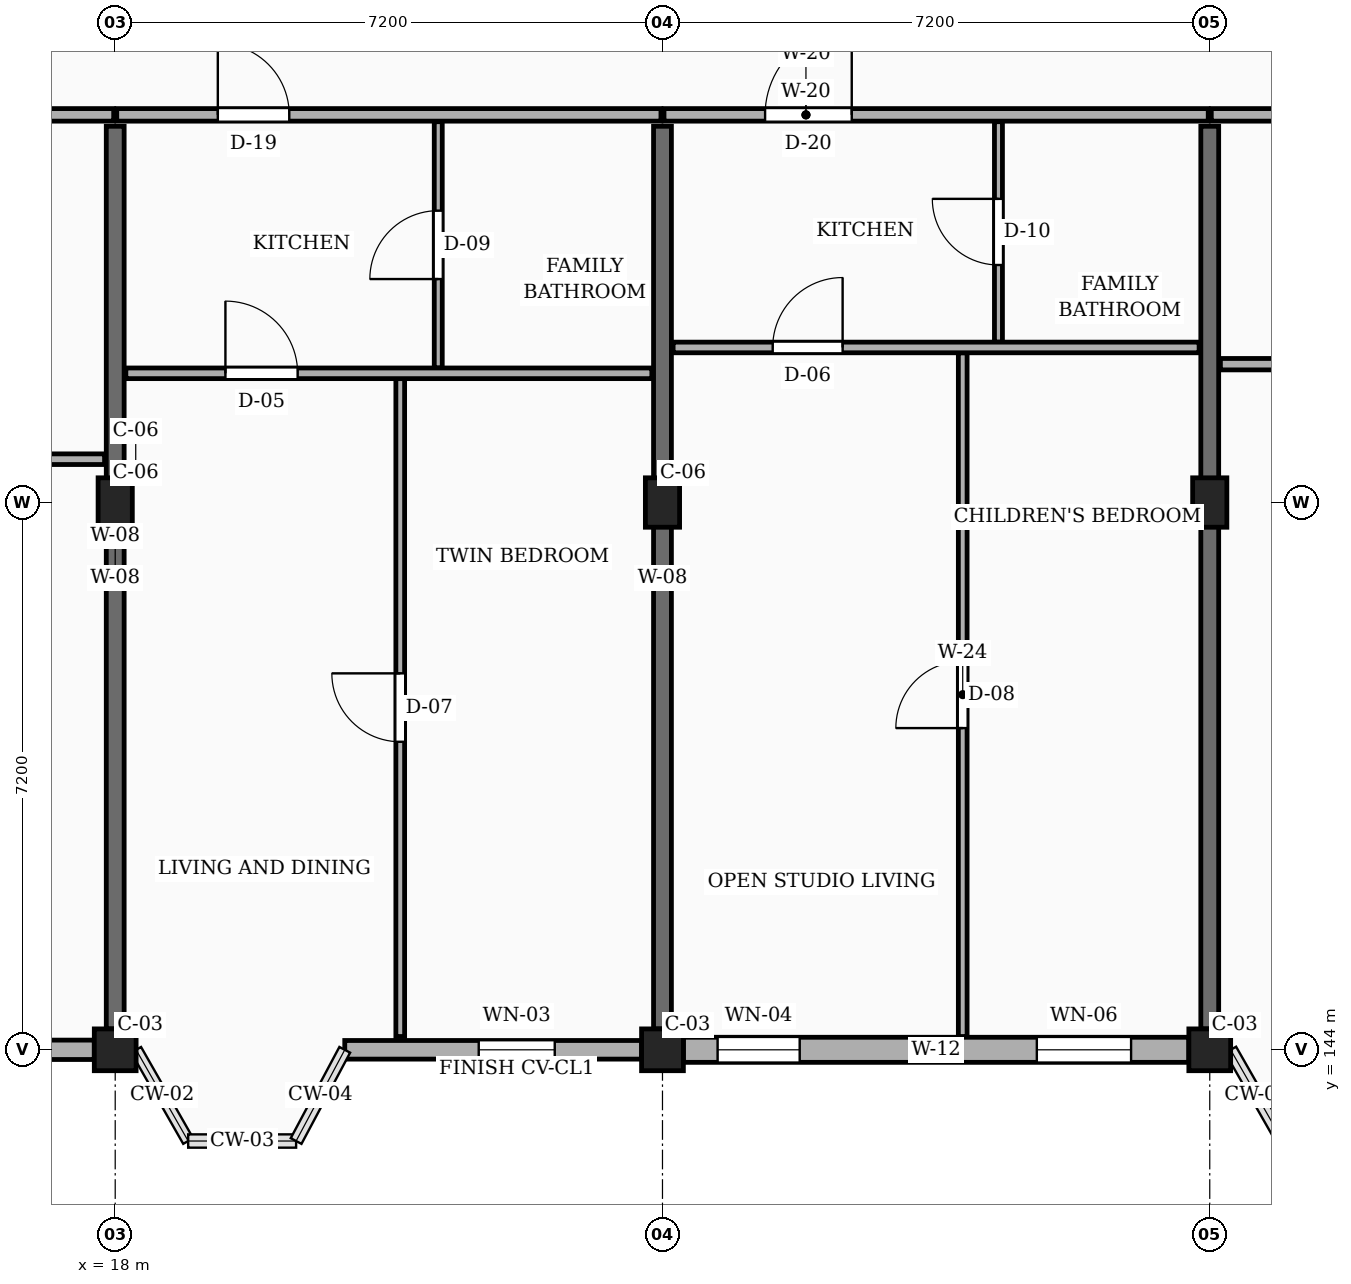
"""IFC4 building model, lengths in metres.
Left out: names, types, materials, properties, quantities, classifications, styles, units other than length and angle.
Written with IfcOpenShell. Run it as: python <this file> out.ifc"""

import sys

from ifc_helpers import new_model, si_unit, direction, frame, frame_2d, origin, origin_2d, place, context, subcontext, project, spatial, rectangle, extrude, element, fill, save


model = new_model("IFC4")
c1 = context("Model", 3, precision=1e-05, world=origin(), true_north=direction((0.0, 1.0)))
c2 = subcontext(c1, "Body", "Model", "MODEL_VIEW")
j1 = project(units=[si_unit("LENGTHUNIT", "METRE"), si_unit("PLANEANGLEUNIT", "RADIAN")], contexts=[c1])
p1 = place(None, origin())
s1 = spatial("IfcSite", under=j1, at=p1, CompositionType="ELEMENT")
p2 = place(p1, origin())
s2 = spatial("IfcBuilding", under=s1, at=p2, CompositionType="ELEMENT")
p3 = place(p2, frame((0.0, 0.0, 17.1)))
s3 = spatial("IfcBuildingStorey", under=s2, at=p3, CompositionType="ELEMENT", Elevation=17.1)
p4 = place(p3, frame((18.0, 144.0, 0.0), z_axis=(0.0, 0.0, 1.0), x_axis=(1.0, 0.0, 0.0)))
e1 = element("IfcColumn", 1, at=p4, inside=s3, PredefinedType="COLUMN", context=c2, shape_type="SweptSolid", body=[
    extrude(rectangle(XDim=0.55, YDim=0.55, at=origin_2d()), origin(), (0.0, 0.0, 1.0), 3.15),
])
p5 = place(p3, frame((18.0, 151.2, 0.0), z_axis=(0.0, 0.0, 1.0), x_axis=(1.0, 0.0, 0.0)))
e2 = element("IfcColumn", 2, at=p5, inside=s3, PredefinedType="COLUMN", context=c2, shape_type="SweptSolid", body=[
    extrude(rectangle(XDim=0.45, YDim=0.65, at=origin_2d()), origin(), (0.0, 0.0, 1.0), 3.15),
])
p6 = place(p3, frame((25.2, 144.0, 0.0), z_axis=(0.0, 0.0, 1.0), x_axis=(1.0, 0.0, 0.0)))
e3 = element("IfcColumn", 3, at=p6, inside=s3, PredefinedType="COLUMN", context=c2, shape_type="SweptSolid", body=[
    extrude(rectangle(XDim=0.55, YDim=0.55, at=origin_2d()), origin(), (0.0, 0.0, 1.0), 3.15),
])
p7 = place(p3, frame((25.2, 151.2, 0.0), z_axis=(0.0, 0.0, 1.0), x_axis=(1.0, 0.0, 0.0)))
e4 = element("IfcColumn", 4, at=p7, inside=s3, PredefinedType="COLUMN", context=c2, shape_type="SweptSolid", body=[
    extrude(rectangle(XDim=0.45, YDim=0.65, at=origin_2d()), origin(), (0.0, 0.0, 1.0), 3.15),
])
p8 = place(p3, frame((32.4, 144.0, 0.0), z_axis=(0.0, 0.0, 1.0), x_axis=(1.0, 0.0, 0.0)))
e5 = element("IfcColumn", 5, at=p8, inside=s3, PredefinedType="COLUMN", context=c2, shape_type="SweptSolid", body=[
    extrude(rectangle(XDim=0.55, YDim=0.55, at=origin_2d()), origin(), (0.0, 0.0, 1.0), 3.15),
])
p9 = place(p3, frame((32.4, 151.2, 0.0), z_axis=(0.0, 0.0, 1.0), x_axis=(1.0, 0.0, 0.0)))
e6 = element("IfcColumn", 6, at=p9, inside=s3, PredefinedType="COLUMN", context=c2, shape_type="SweptSolid", body=[
    extrude(rectangle(XDim=0.45, YDim=0.65, at=origin_2d()), origin(), (0.0, 0.0, 1.0), 3.15),
])
for number, where, z_axis, x_axis in (
    (7, (18.0, 144.275, 0.0), (0.0, 0.0, 1.0), (0.0, 1.0, 0.0)),
    (8, (25.2, 144.275, 0.0), (0.0, 0.0, 1.0), (0.0, 1.0, 0.0)),
    (9, (32.4, 144.275, 0.0), (0.0, 0.0, 1.0), (0.0, 1.0, 0.0)),
):
    element("IfcWall", number, at=place(p3, frame(where, z_axis=z_axis, x_axis=x_axis)), inside=s3, PredefinedType="SOLIDWALL", context=c2, shape_type="SweptSolid", body=[
        extrude(rectangle(XDim=11.875, YDim=0.235, at=frame_2d((5.938, 0.0))), origin(), (0.0, 0.0, 1.0), 2.185),
    ])
p10 = place(p3, frame((11.075, 144.0, 0.0), z_axis=(0.0, 0.0, 1.0), x_axis=(1.0, 0.0, 0.0)))
e10 = element("IfcWall", 10, at=p10, inside=s3, PredefinedType="SOLIDWALL", context=c2, shape_type="SweptSolid", body=[
    extrude(rectangle(XDim=6.65, YDim=0.255, at=frame_2d((3.325, 0.0))), origin(), (0.0, 0.0, 1.0), 2.455),
])
p11 = place(p10, frame((0.45, 0.0, 0.78)))
e11 = element("IfcOpeningElement", 11, at=p11, cuts=e10, PredefinedType="OPENING", context=c2, shape_type="SweptSolid", body=[
    extrude(rectangle(XDim=0.85, YDim=1.15, at=frame_2d((0.425, 0.575))), frame((0.0, 0.137, 0.0), z_axis=(0.0, -1.0, 0.0), x_axis=(1.0, 0.0, 0.0)), (0.0, 0.0, 1.0), 0.275),
])
p12 = place(p10, frame((4.65, 0.0, 0.78)))
e12 = element("IfcOpeningElement", 12, at=p12, cuts=e10, PredefinedType="OPENING", context=c2, shape_type="SweptSolid", body=[
    extrude(rectangle(XDim=1.0, YDim=1.15, at=frame_2d((0.5, 0.575))), frame((0.0, 0.137, 0.0), z_axis=(0.0, -1.0, 0.0), x_axis=(1.0, 0.0, 0.0)), (0.0, 0.0, 1.0), 0.275),
])
p13 = place(p3, frame((21.02, 144.0, 0.0), z_axis=(0.0, 0.0, 1.0), x_axis=(1.0, 0.0, 0.0)))
e13 = element("IfcWall", 13, at=p13, inside=s3, PredefinedType="SOLIDWALL", context=c2, shape_type="SweptSolid", body=[
    extrude(rectangle(XDim=3.905, YDim=0.245, at=frame_2d((1.953, 0.0))), origin(), (0.0, 0.0, 1.0), 2.455),
])
p14 = place(p13, frame((1.762, 0.0, 0.78)))
e14 = element("IfcOpeningElement", 14, at=p14, cuts=e13, PredefinedType="OPENING", context=c2, shape_type="SweptSolid", body=[
    extrude(rectangle(XDim=1.0, YDim=1.15, at=frame_2d((0.5, 0.575))), frame((0.0, 0.133, 0.0), z_axis=(0.0, -1.0, 0.0), x_axis=(1.0, 0.0, 0.0)), (0.0, 0.0, 1.0), 0.265),
])
p15 = place(p3, frame((25.475, 144.0, 0.0), z_axis=(0.0, 0.0, 1.0), x_axis=(1.0, 0.0, 0.0)))
e15 = element("IfcWall", 15, at=p15, inside=s3, PredefinedType="SOLIDWALL", context=c2, shape_type="SweptSolid", body=[
    extrude(rectangle(XDim=6.65, YDim=0.33, at=frame_2d((3.325, 0.0))), origin(), (0.0, 0.0, 1.0), 2.455),
])
p16 = place(p15, frame((0.45, 0.0, 0.78)))
e16 = element("IfcOpeningElement", 16, at=p16, cuts=e15, PredefinedType="OPENING", context=c2, shape_type="SweptSolid", body=[
    extrude(rectangle(XDim=1.08, YDim=1.15, at=frame_2d((0.54, 0.575))), frame((0.0, 0.175, 0.0), z_axis=(0.0, -1.0, 0.0), x_axis=(1.0, 0.0, 0.0)), (0.0, 0.0, 1.0), 0.35),
])
p17 = place(p15, frame((4.65, 0.0, 0.78)))
e17 = element("IfcOpeningElement", 17, at=p17, cuts=e15, PredefinedType="OPENING", context=c2, shape_type="SweptSolid", body=[
    extrude(rectangle(XDim=1.24, YDim=1.15, at=frame_2d((0.62, 0.575))), frame((0.0, 0.175, 0.0), z_axis=(0.0, -1.0, 0.0), x_axis=(1.0, 0.0, 0.0)), (0.0, 0.0, 1.0), 0.35),
])
p18 = place(p3, frame((10.975, 156.3, 0.0), z_axis=(0.0, 0.0, 1.0), x_axis=(1.0, 0.0, 0.0)))
e18 = element("IfcWall", 18, at=p18, inside=s3, PredefinedType="PARTITIONING", context=c2, shape_type="SweptSolid", body=[
    extrude(rectangle(XDim=7.005, YDim=0.165, at=frame_2d((3.502, 0.0))), origin(), (0.0, 0.0, 1.0), 2.32),
])
p19 = place(p18, frame((4.625, 0.0, 0.0)))
e19 = element("IfcOpeningElement", 19, at=p19, cuts=e18, PredefinedType="OPENING", context=c2, shape_type="SweptSolid", body=[
    extrude(rectangle(XDim=1.0, YDim=2.15, at=frame_2d((0.5, 1.075))), frame((0.0, 0.093, 0.0), z_axis=(0.0, -1.0, 0.0), x_axis=(1.0, 0.0, 0.0)), (0.0, 0.0, 1.0), 0.185),
])
p20 = place(p3, frame((18.02, 156.3, 0.0), z_axis=(0.0, 0.0, 1.0), x_axis=(1.0, 0.0, 0.0)))
e20 = element("IfcWall", 20, at=p20, inside=s3, PredefinedType="PARTITIONING", context=c2, shape_type="SweptSolid", body=[
    extrude(rectangle(XDim=7.16, YDim=0.165, at=frame_2d((3.58, 0.0))), origin(), (0.0, 0.0, 1.0), 2.32),
])
p21 = place(p20, frame((1.33, 0.0, 0.0)))
e21 = element("IfcOpeningElement", 21, at=p21, cuts=e20, PredefinedType="OPENING", context=c2, shape_type="SweptSolid", body=[
    extrude(rectangle(XDim=0.94, YDim=2.12, at=frame_2d((0.47, 1.06))), frame((0.0, 0.093, 0.0), z_axis=(0.0, -1.0, 0.0), x_axis=(1.0, 0.0, 0.0)), (0.0, 0.0, 1.0), 0.185),
])
p22 = place(p3, frame((25.22, 156.3, 0.0), z_axis=(0.0, 0.0, 1.0), x_axis=(1.0, 0.0, 0.0)))
e22 = element("IfcWall", 22, at=p22, inside=s3, PredefinedType="PARTITIONING", context=c2, shape_type="SweptSolid", body=[
    extrude(rectangle(XDim=7.16, YDim=0.165, at=frame_2d((3.58, 0.0))), origin(), (0.0, 0.0, 1.0), 2.32),
])
p23 = place(p22, frame((1.33, 0.0, 0.0)))
e23 = element("IfcOpeningElement", 23, at=p23, cuts=e22, PredefinedType="OPENING", context=c2, shape_type="SweptSolid", body=[
    extrude(rectangle(XDim=1.14, YDim=2.18, at=frame_2d((0.57, 1.09))), frame((0.0, 0.093, 0.0), z_axis=(0.0, -1.0, 0.0), x_axis=(1.0, 0.0, 0.0)), (0.0, 0.0, 1.0), 0.185),
])
p24 = place(p3, frame((32.42, 156.3, 0.0), z_axis=(0.0, 0.0, 1.0), x_axis=(1.0, 0.0, 0.0)))
e24 = element("IfcWall", 24, at=p24, inside=s3, PredefinedType="PARTITIONING", context=c2, shape_type="SweptSolid", body=[
    extrude(rectangle(XDim=7.16, YDim=0.165, at=frame_2d((3.58, 0.0))), origin(), (0.0, 0.0, 1.0), 2.32),
])
p25 = place(p24, frame((1.33, 0.0, 0.0)))
e25 = element("IfcOpeningElement", 25, at=p25, cuts=e24, PredefinedType="OPENING", context=c2, shape_type="SweptSolid", body=[
    extrude(rectangle(XDim=1.0, YDim=2.15, at=frame_2d((0.5, 1.075))), frame((0.0, 0.093, 0.0), z_axis=(0.0, -1.0, 0.0), x_axis=(1.0, 0.0, 0.0)), (0.0, 0.0, 1.0), 0.185),
])
p26 = place(p3, frame((10.975, 151.77, 0.0), z_axis=(0.0, 0.0, 1.0), x_axis=(1.0, 0.0, 0.0)))
e26 = element("IfcWall", 26, at=p26, inside=s3, PredefinedType="PARTITIONING", context=c2, shape_type="SweptSolid", body=[
    extrude(rectangle(XDim=6.885, YDim=0.14, at=frame_2d((3.442, 0.0))), origin(), (0.0, 0.0, 1.0), 2.32),
])
p27 = place(p26, frame((4.625, 0.0, 0.0)))
e27 = element("IfcOpeningElement", 27, at=p27, cuts=e26, PredefinedType="OPENING", context=c2, shape_type="SweptSolid", body=[
    extrude(rectangle(XDim=0.92, YDim=2.1, at=frame_2d((0.46, 1.05))), frame((0.0, 0.08, 0.0), z_axis=(0.0, -1.0, 0.0), x_axis=(1.0, 0.0, 0.0)), (0.0, 0.0, 1.0), 0.16),
])
p28 = place(p3, frame((21.75, 144.175, 0.0), z_axis=(0.0, 0.0, 1.0), x_axis=(0.0, 1.0, 0.0)))
e28 = element("IfcWall", 28, at=p28, inside=s3, PredefinedType="PARTITIONING", context=c2, shape_type="SweptSolid", body=[
    extrude(rectangle(XDim=8.655, YDim=0.115, at=frame_2d((4.328, 0.0))), origin(), (0.0, 0.0, 1.0), 2.32),
])
p29 = place(p28, frame((3.877, 0.0, 0.0)))
e29 = element("IfcOpeningElement", 29, at=p29, cuts=e28, PredefinedType="OPENING", context=c2, shape_type="SweptSolid", body=[
    extrude(rectangle(XDim=0.9, YDim=2.1, at=frame_2d((0.45, 1.05))), frame((0.0, 0.067, 0.0), z_axis=(0.0, -1.0, 0.0), x_axis=(1.0, 0.0, 0.0)), (0.0, 0.0, 1.0), 0.135),
])
p30 = place(p3, frame((22.25, 152.97, 0.0), z_axis=(0.0, 0.0, 1.0), x_axis=(0.0, 1.0, 0.0)))
e30 = element("IfcWall", 30, at=p30, inside=s3, PredefinedType="PARTITIONING", context=c2, shape_type="SweptSolid", body=[
    extrude(rectangle(XDim=3.24, YDim=0.105, at=frame_2d((1.62, 0.0))), origin(), (0.0, 0.0, 1.0), 2.32),
])
p31 = place(p30, frame((1.17, 0.0, 0.0)))
e31 = element("IfcOpeningElement", 31, at=p31, cuts=e30, PredefinedType="OPENING", context=c2, shape_type="SweptSolid", body=[
    extrude(rectangle(XDim=0.9, YDim=2.05, at=frame_2d((0.45, 1.025))), frame((0.0, 0.062, 0.0), z_axis=(0.0, -1.0, 0.0), x_axis=(1.0, 0.0, 0.0)), (0.0, 0.0, 1.0), 0.125),
])
p32 = place(p3, frame((18.14, 152.9, 0.0), z_axis=(0.0, 0.0, 1.0), x_axis=(1.0, 0.0, 0.0)))
e32 = element("IfcWall", 32, at=p32, inside=s3, PredefinedType="PARTITIONING", context=c2, shape_type="SweptSolid", body=[
    extrude(rectangle(XDim=6.92, YDim=0.14, at=frame_2d((3.46, 0.0))), origin(), (0.0, 0.0, 1.0), 2.32),
])
p33 = place(p32, frame((1.31, 0.0, 0.0)))
e33 = element("IfcOpeningElement", 33, at=p33, cuts=e32, PredefinedType="OPENING", context=c2, shape_type="SweptSolid", body=[
    extrude(rectangle(XDim=0.95, YDim=2.1, at=frame_2d((0.475, 1.05))), frame((0.0, 0.08, 0.0), z_axis=(0.0, -1.0, 0.0), x_axis=(1.0, 0.0, 0.0)), (0.0, 0.0, 1.0), 0.16),
])
p34 = place(p3, frame((29.15, 144.175, 0.0), z_axis=(0.0, 0.0, 1.0), x_axis=(0.0, 1.0, 0.0)))
e34 = element("IfcWall", 34, at=p34, inside=s3, PredefinedType="PARTITIONING", context=c2, shape_type="SweptSolid", body=[
    extrude(rectangle(XDim=8.995, YDim=0.115, at=frame_2d((4.498, 0.0))), origin(), (0.0, 0.0, 1.0), 2.32),
])
p35 = place(p34, frame((4.058, 0.0, 0.0)))
e35 = element("IfcOpeningElement", 35, at=p35, cuts=e34, PredefinedType="OPENING", context=c2, shape_type="SweptSolid", body=[
    extrude(rectangle(XDim=0.88, YDim=2.08, at=frame_2d((0.44, 1.04))), frame((0.0, 0.067, 0.0), z_axis=(0.0, -1.0, 0.0), x_axis=(1.0, 0.0, 0.0)), (0.0, 0.0, 1.0), 0.135),
])
p36 = place(p3, frame((29.62, 153.31, 0.0), z_axis=(0.0, 0.0, 1.0), x_axis=(0.0, 1.0, 0.0)))
e36 = element("IfcWall", 36, at=p36, inside=s3, PredefinedType="PARTITIONING", context=c2, shape_type="SweptSolid", body=[
    extrude(rectangle(XDim=2.9, YDim=0.105, at=frame_2d((1.45, 0.0))), origin(), (0.0, 0.0, 1.0), 2.32),
])
p37 = place(p36, frame((1.015, 0.0, 0.0)))
e37 = element("IfcOpeningElement", 37, at=p37, cuts=e36, PredefinedType="OPENING", context=c2, shape_type="SweptSolid", body=[
    extrude(rectangle(XDim=0.87, YDim=2.05, at=frame_2d((0.435, 1.025))), frame((0.0, 0.062, 0.0), z_axis=(0.0, -1.0, 0.0), x_axis=(1.0, 0.0, 0.0)), (0.0, 0.0, 1.0), 0.125),
])
p38 = place(p3, frame((25.34, 153.24, 0.0), z_axis=(0.0, 0.0, 1.0), x_axis=(1.0, 0.0, 0.0)))
e38 = element("IfcWall", 38, at=p38, inside=s3, PredefinedType="PARTITIONING", context=c2, shape_type="SweptSolid", body=[
    extrude(rectangle(XDim=6.92, YDim=0.14, at=frame_2d((3.46, 0.0))), origin(), (0.0, 0.0, 1.0), 2.32),
])
p39 = place(p38, frame((1.31, 0.0, 0.0)))
e39 = element("IfcOpeningElement", 39, at=p39, cuts=e38, PredefinedType="OPENING", context=c2, shape_type="SweptSolid", body=[
    extrude(rectangle(XDim=0.92, YDim=2.1, at=frame_2d((0.46, 1.05))), frame((0.0, 0.08, 0.0), z_axis=(0.0, -1.0, 0.0), x_axis=(1.0, 0.0, 0.0)), (0.0, 0.0, 1.0), 0.16),
])
p40 = place(p3, frame((32.54, 153.02, 0.0), z_axis=(0.0, 0.0, 1.0), x_axis=(1.0, 0.0, 0.0)))
e40 = element("IfcWall", 40, at=p40, inside=s3, PredefinedType="PARTITIONING", context=c2, shape_type="SweptSolid", body=[
    extrude(rectangle(XDim=6.92, YDim=0.15, at=frame_2d((3.46, 0.0))), origin(), (0.0, 0.0, 1.0), 2.32),
])
p41 = place(p40, frame((1.31, 0.0, 0.0)))
e41 = element("IfcOpeningElement", 41, at=p41, cuts=e40, PredefinedType="OPENING", context=c2, shape_type="SweptSolid", body=[
    extrude(rectangle(XDim=0.95, YDim=2.1, at=frame_2d((0.475, 1.05))), frame((0.0, 0.085, 0.0), z_axis=(0.0, -1.0, 0.0), x_axis=(1.0, 0.0, 0.0)), (0.0, 0.0, 1.0), 0.17),
])
p42 = place(p14, origin())
e42 = element("IfcWindow", 42, at=p42, inside=s3, PartitioningType="SINGLE_PANEL", PredefinedType="WINDOW", context=c2, shape_type="SweptSolid", body=[
    extrude(rectangle(XDim=1.0, YDim=1.15, at=frame_2d((0.5, 0.575))), frame((0.0, 0.03, 0.0), z_axis=(0.0, -1.0, 0.0), x_axis=(1.0, 0.0, 0.0)), (0.0, 0.0, 1.0), 0.06),
])
fill(e14, e42)
p43 = place(p16, origin())
e43 = element("IfcWindow", 43, at=p43, inside=s3, PartitioningType="SINGLE_PANEL", PredefinedType="WINDOW", context=c2, shape_type="SweptSolid", body=[
    extrude(rectangle(XDim=1.08, YDim=1.15, at=frame_2d((0.54, 0.575))), frame((0.0, 0.03, 0.0), z_axis=(0.0, -1.0, 0.0), x_axis=(1.0, 0.0, 0.0)), (0.0, 0.0, 1.0), 0.06),
])
fill(e16, e43)
p44 = place(p17, origin())
e44 = element("IfcWindow", 44, at=p44, inside=s3, PartitioningType="SINGLE_PANEL", PredefinedType="WINDOW", context=c2, shape_type="SweptSolid", body=[
    extrude(rectangle(XDim=1.24, YDim=1.15, at=frame_2d((0.62, 0.575))), frame((0.0, 0.03, 0.0), z_axis=(0.0, -1.0, 0.0), x_axis=(1.0, 0.0, 0.0)), (0.0, 0.0, 1.0), 0.06),
])
fill(e17, e44)
p45 = place(p21, origin())
e45 = element("IfcDoor", 45, at=p45, inside=s3, OperationType="SINGLE_SWING_LEFT", PredefinedType="DOOR", context=c2, shape_type="SweptSolid", body=[
    extrude(rectangle(XDim=0.94, YDim=2.12, at=frame_2d((0.47, 1.06))), frame((0.0, 0.025, 0.0), z_axis=(0.0, -1.0, 0.0), x_axis=(1.0, 0.0, 0.0)), (0.0, 0.0, 1.0), 0.05),
])
fill(e21, e45)
p46 = place(p23, origin())
e46 = element("IfcDoor", 46, at=p46, inside=s3, OperationType="SINGLE_SWING_RIGHT", PredefinedType="DOOR", context=c2, shape_type="SweptSolid", body=[
    extrude(rectangle(XDim=1.14, YDim=2.18, at=frame_2d((0.57, 1.09))), frame((0.0, 0.025, 0.0), z_axis=(0.0, -1.0, 0.0), x_axis=(1.0, 0.0, 0.0)), (0.0, 0.0, 1.0), 0.05),
])
fill(e23, e46)
p47 = place(p29, origin())
e47 = element("IfcDoor", 47, at=p47, inside=s3, OperationType="SINGLE_SWING_RIGHT", PredefinedType="DOOR", context=c2, shape_type="SweptSolid", body=[
    extrude(rectangle(XDim=0.9, YDim=2.1, at=frame_2d((0.45, 1.05))), frame((0.0, 0.025, 0.0), z_axis=(0.0, -1.0, 0.0), x_axis=(1.0, 0.0, 0.0)), (0.0, 0.0, 1.0), 0.05),
])
fill(e29, e47)
p48 = place(p31, origin())
e48 = element("IfcDoor", 48, at=p48, inside=s3, OperationType="SINGLE_SWING_LEFT", PredefinedType="DOOR", context=c2, shape_type="SweptSolid", body=[
    extrude(rectangle(XDim=0.9, YDim=2.05, at=frame_2d((0.45, 1.025))), frame((0.0, 0.025, 0.0), z_axis=(0.0, -1.0, 0.0), x_axis=(1.0, 0.0, 0.0)), (0.0, 0.0, 1.0), 0.05),
])
fill(e31, e48)
p49 = place(p33, origin())
e49 = element("IfcDoor", 49, at=p49, inside=s3, OperationType="SINGLE_SWING_LEFT", PredefinedType="DOOR", context=c2, shape_type="SweptSolid", body=[
    extrude(rectangle(XDim=0.95, YDim=2.1, at=frame_2d((0.475, 1.05))), frame((0.0, 0.025, 0.0), z_axis=(0.0, -1.0, 0.0), x_axis=(1.0, 0.0, 0.0)), (0.0, 0.0, 1.0), 0.05),
])
fill(e33, e49)
p50 = place(p35, origin())
e50 = element("IfcDoor", 50, at=p50, inside=s3, OperationType="SINGLE_SWING_LEFT", PredefinedType="DOOR", context=c2, shape_type="SweptSolid", body=[
    extrude(rectangle(XDim=0.88, YDim=2.08, at=frame_2d((0.44, 1.04))), frame((0.0, 0.025, 0.0), z_axis=(0.0, -1.0, 0.0), x_axis=(1.0, 0.0, 0.0)), (0.0, 0.0, 1.0), 0.05),
])
fill(e35, e50)
p51 = place(p37, origin())
e51 = element("IfcDoor", 51, at=p51, inside=s3, OperationType="SINGLE_SWING_RIGHT", PredefinedType="DOOR", context=c2, shape_type="SweptSolid", body=[
    extrude(rectangle(XDim=0.87, YDim=2.05, at=frame_2d((0.435, 1.025))), frame((0.0, 0.025, 0.0), z_axis=(0.0, -1.0, 0.0), x_axis=(1.0, 0.0, 0.0)), (0.0, 0.0, 1.0), 0.05),
])
fill(e37, e51)
p52 = place(p39, origin())
e52 = element("IfcDoor", 52, at=p52, inside=s3, OperationType="SINGLE_SWING_RIGHT", PredefinedType="DOOR", context=c2, shape_type="SweptSolid", body=[
    extrude(rectangle(XDim=0.92, YDim=2.1, at=frame_2d((0.46, 1.05))), frame((0.0, 0.025, 0.0), z_axis=(0.0, -1.0, 0.0), x_axis=(1.0, 0.0, 0.0)), (0.0, 0.0, 1.0), 0.05),
])
fill(e39, e52)
save(model, sys.argv[1])
